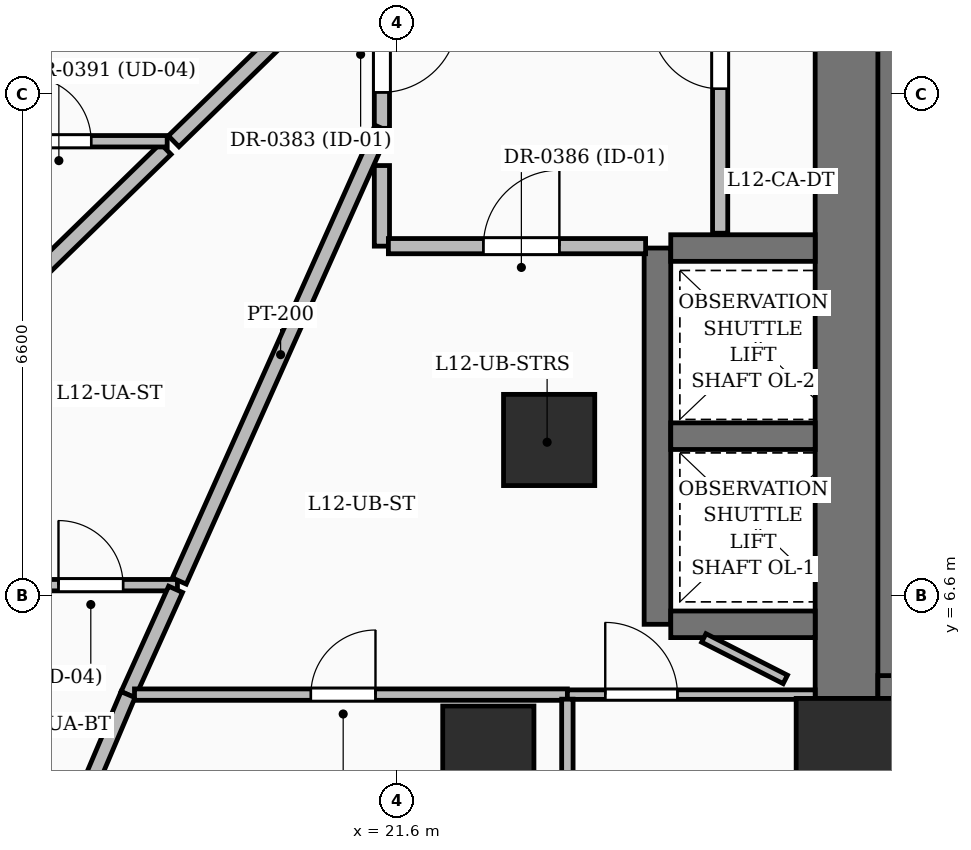
"""IFC4 building model, lengths in metres.
Left out: names, types, materials, properties, quantities, classifications, styles, units other than length and angle.
Written with IfcOpenShell. Run it as: python <this file> out.ifc"""

import sys

from ifc_helpers import new_model, si_unit, direction, frame, frame_2d, origin, origin_2d, place, context, subcontext, project, spatial, rectangle, extrude, element, fill, save


model = new_model("IFC4")
c1 = context("Model", 3, precision=1e-05, world=origin(), true_north=direction((0.0, 1.0)))
c2 = subcontext(c1, "Body", "Model", "MODEL_VIEW")
j1 = project(units=[si_unit("LENGTHUNIT", "METRE"), si_unit("PLANEANGLEUNIT", "RADIAN")], contexts=[c1])
p1 = place(None, origin())
s1 = spatial("IfcSite", under=j1, at=p1, CompositionType="ELEMENT")
p2 = place(p1, origin())
s2 = spatial("IfcBuilding", under=s1, at=p2, CompositionType="ELEMENT")
p3 = place(p2, frame((0.0, 0.0, 53.4)))
s3 = spatial("IfcBuildingStorey", under=s2, at=p3, CompositionType="ELEMENT", Elevation=53.4)
p4 = place(p3, frame((27.55, 4.55, 0.0), z_axis=(0.0, 0.0, 1.0), x_axis=(1.0, 0.0, 0.0)))
e1 = element("IfcColumn", 1, at=p4, inside=s3, PredefinedType="COLUMN", context=c2, shape_type="SweptSolid", body=[
    extrude(rectangle(XDim=1.4, YDim=1.4, at=origin_2d()), origin(), (0.0, 0.0, 1.0), 3.6),
])
for number, where, z_axis, x_axis in (
    (2, (22.8, 4.55, 0.0), (0.0, 0.0, 1.0), (1.0, 0.0, 0.0)),
    (3, (23.6, 8.65, 0.0), (0.0, 0.0, 1.0), (1.0, 0.0, 0.0)),
):
    element("IfcColumn", number, at=place(p3, frame(where, z_axis=z_axis, x_axis=x_axis)), inside=s3, PredefinedType="COLUMN", context=c2, shape_type="SweptSolid", body=[
        extrude(rectangle(XDim=1.2, YDim=1.2, at=origin_2d()), origin(), (0.0, 0.0, 1.0), 3.6),
    ])
p5 = place(p3, frame((27.55, 5.25, 0.0), z_axis=(0.0, 0.0, 1.0), x_axis=(0.0, 1.0, 0.0)))
e4 = element("IfcWall", 4, at=p5, inside=s3, PredefinedType="SHEAR", context=c2, shape_type="SweptSolid", body=[
    extrude(rectangle(XDim=8.8, YDim=0.9, at=frame_2d((4.4, 0.0))), origin(), (0.0, 0.0, 1.0), 3.6),
])
p6 = place(p3, frame((28.1, 5.2, 0.0), z_axis=(0.0, 0.0, 1.0), x_axis=(0.0, 1.0, 0.0)))
e5 = element("IfcWall", 5, at=p6, inside=s3, PredefinedType="SOLIDWALL", context=c2, shape_type="SweptSolid", body=[
    extrude(rectangle(XDim=9.1, YDim=0.35, at=frame_2d((4.55, 0.0))), origin(), (0.0, 0.0, 1.0), 3.6),
])
p7 = place(p3, frame((27.925, 5.375, 0.0), z_axis=(0.0, 0.0, 1.0), x_axis=(1.0, 0.0, 0.0)))
e6 = element("IfcWall", 6, at=p7, inside=s3, PredefinedType="SOLIDWALL", context=c2, shape_type="SweptSolid", body=[
    extrude(rectangle(XDim=3.55, YDim=0.35, at=frame_2d((1.775, 0.0))), origin(), (0.0, 0.0, 1.0), 3.6),
])
p8 = place(p3, frame((25.025, 6.225, 0.0), z_axis=(0.0, 0.0, 1.0), x_axis=(0.0, 1.0, 0.0)))
e7 = element("IfcWall", 7, at=p8, inside=s3, PredefinedType="SOLIDWALL", context=c2, shape_type="SweptSolid", body=[
    extrude(rectangle(XDim=4.95, YDim=0.35, at=frame_2d((2.475, 0.0))), origin(), (0.0, 0.0, 1.0), 3.6),
])
for number, where, z_axis, x_axis in (
    (8, (25.2, 6.225, 0.0), (0.0, 0.0, 1.0), (1.0, 0.0, 0.0)),
    (9, (25.2, 8.7, 0.0), (0.0, 0.0, 1.0), (1.0, 0.0, 0.0)),
    (10, (25.2, 11.175, 0.0), (0.0, 0.0, 1.0), (1.0, 0.0, 0.0)),
):
    element("IfcWall", number, at=place(p3, frame(where, z_axis=z_axis, x_axis=x_axis)), inside=s3, PredefinedType="SOLIDWALL", context=c2, shape_type="SweptSolid", body=[
        extrude(rectangle(XDim=1.9, YDim=0.35, at=frame_2d((0.95, 0.0))), origin(), (0.0, 0.0, 1.0), 3.6),
    ])
p9 = place(p3, frame((25.85, 11.37, 0.0), z_axis=(0.0, 0.0, 1.0), x_axis=(0.0, 1.0, 0.0)))
e11 = element("IfcWall", 11, at=p9, inside=s3, PredefinedType="PARTITIONING", context=c2, shape_type="SweptSolid", body=[
    extrude(rectangle(XDim=3.34, YDim=0.2, at=frame_2d((1.67, 0.0))), origin(), (0.0, 0.0, 1.0), 3.35),
])
p10 = place(p9, frame((1.9, 0.0, 0.0)))
e12 = element("IfcOpeningElement", 12, at=p10, cuts=e11, PredefinedType="OPENING", context=c2, shape_type="SweptSolid", body=[
    extrude(rectangle(XDim=0.9, YDim=2.1, at=frame_2d((0.45, 1.05))), frame((0.0, 0.11, 0.0), z_axis=(0.0, -1.0, 0.0), x_axis=(1.0, 0.0, 0.0)), (0.0, 0.0, 1.0), 0.22),
])
p11 = place(p3, frame((21.4, 15.09, 0.0), z_axis=(0.0, 0.0, 1.0), x_axis=(0.0, -1.0, 0.0)))
e13 = element("IfcWall", 13, at=p11, inside=s3, PredefinedType="PARTITIONING", context=c2, shape_type="SweptSolid", body=[
    extrude(rectangle(XDim=2.34, YDim=0.2, at=frame_2d((1.17, 0.0))), origin(), (0.0, 0.0, 1.0), 3.01),
])
p12 = place(p11, frame((0.867, 0.0, 0.0)))
e14 = element("IfcOpeningElement", 14, at=p12, cuts=e13, PredefinedType="OPENING", context=c2, shape_type="SweptSolid", body=[
    extrude(rectangle(XDim=1.0, YDim=2.2, at=frame_2d((0.5, 1.1))), frame((0.0, 0.11, 0.0), z_axis=(0.0, -1.0, 0.0), x_axis=(1.0, 0.0, 0.0)), (0.0, 0.0, 1.0), 0.22),
])
p13 = place(p3, frame((21.4, 12.26, 0.0), z_axis=(0.0, 0.0, 1.0), x_axis=(0.0, -1.0, 0.0)))
e15 = element("IfcWall", 15, at=p13, inside=s3, PredefinedType="PARTITIONING", context=c2, shape_type="SweptSolid", body=[
    extrude(rectangle(XDim=1.061, YDim=0.2, at=frame_2d((0.53, 0.0))), origin(), (0.0, 0.0, 1.0), 3.35),
])
p14 = place(p3, frame((21.485, 11.2, 0.0), z_axis=(0.0, 0.0, 1.0), x_axis=(1.0, 0.0, 0.0)))
e16 = element("IfcWall", 16, at=p14, inside=s3, PredefinedType="PARTITIONING", context=c2, shape_type="SweptSolid", body=[
    extrude(rectangle(XDim=3.384, YDim=0.2, at=frame_2d((1.692, 0.0))), origin(), (0.0, 0.0, 1.0), 3.01),
])
p15 = place(p14, frame((1.25, 0.0, 0.0)))
e17 = element("IfcOpeningElement", 17, at=p15, cuts=e16, PredefinedType="OPENING", context=c2, shape_type="SweptSolid", body=[
    extrude(rectangle(XDim=1.0, YDim=2.2, at=frame_2d((0.5, 1.1))), frame((0.0, 0.11, 0.0), z_axis=(0.0, -1.0, 0.0), x_axis=(1.0, 0.0, 0.0)), (0.0, 0.0, 1.0), 0.22),
])
p16 = place(p3, frame((16.43, 6.74, 0.0), z_axis=(0.0, 0.0, 1.0), x_axis=(1.0, 0.0, 0.0)))
e18 = element("IfcWall", 18, at=p16, inside=s3, PredefinedType="PARTITIONING", context=c2, shape_type="SweptSolid", body=[
    extrude(rectangle(XDim=2.28, YDim=0.15, at=frame_2d((1.14, 0.0))), origin(), (0.0, 0.0, 1.0), 2.37),
])
p17 = place(p16, frame((0.715, 0.0, 0.0)))
e19 = element("IfcOpeningElement", 19, at=p17, cuts=e18, PredefinedType="OPENING", context=c2, shape_type="SweptSolid", body=[
    extrude(rectangle(XDim=0.85, YDim=2.1, at=frame_2d((0.425, 1.05))), frame((0.0, 0.085, 0.0), z_axis=(0.0, -1.0, 0.0), x_axis=(1.0, 0.0, 0.0)), (0.0, 0.0, 1.0), 0.17),
])
p18 = place(p3, frame((18.735, 6.795, 0.0), z_axis=(0.0, 0.0, 1.0), x_axis=(0.408515389568, 0.912751431928, 0.0)))
e20 = element("IfcWall", 20, at=p18, inside=s3, PredefinedType="PARTITIONING", context=c2, shape_type="SweptSolid", body=[
    extrude(rectangle(XDim=6.524, YDim=0.2, at=frame_2d((3.262, 0.0))), origin(), (0.0, 0.0, 1.0), 2.279),
])
p19 = place(p3, frame((21.339, 15.191, 0.0), z_axis=(0.0, 0.0, 1.0), x_axis=(-0.716217041319, -0.697877603684, 0.0)))
e21 = element("IfcWall", 21, at=p19, inside=s3, PredefinedType="PARTITIONING", context=c2, shape_type="SweptSolid", body=[
    extrude(rectangle(XDim=3.741, YDim=0.2, at=frame_2d((1.87, 0.0))), origin(), (0.0, 0.0, 1.0), 3.35),
])
p20 = place(p3, frame((18.556, 12.479, 0.0), z_axis=(0.0, 0.0, 1.0), x_axis=(-0.716529276708, -0.69755701962, 0.0)))
e22 = element("IfcWall", 22, at=p20, inside=s3, PredefinedType="PARTITIONING", context=c2, shape_type="SweptSolid", body=[
    extrude(rectangle(XDim=3.925, YDim=0.2, at=frame_2d((1.962, 0.0))), origin(), (0.0, 0.0, 1.0), 2.279),
])
p21 = place(p3, frame((18.06, 5.3, 0.0), z_axis=(0.0, 0.0, 1.0), x_axis=(0.411393031605, 0.911458048155, 0.0)))
e23 = element("IfcWall", 23, at=p21, inside=s3, PredefinedType="PARTITIONING", context=c2, shape_type="SweptSolid", body=[
    extrude(rectangle(XDim=1.52, YDim=0.2, at=frame_2d((0.76, 0.0))), origin(), (0.0, 0.0, 1.0), 3.01),
])
p22 = place(p3, frame((16.627, 1.918, 0.0), z_axis=(0.0, 0.0, 1.0), x_axis=(0.390153809481, 0.920749697229, 0.0)))
e24 = element("IfcWall", 24, at=p22, inside=s3, PredefinedType="PARTITIONING", context=c2, shape_type="SweptSolid", body=[
    extrude(rectangle(XDim=3.673, YDim=0.2, at=frame_2d((1.836, 0.0))), origin(), (0.0, 0.0, 1.0), 2.37),
])
p23 = place(p3, frame((18.145, 5.3, 0.0), z_axis=(0.0, 0.0, 1.0), x_axis=(1.0, 0.0, 0.0)))
e25 = element("IfcWall", 25, at=p23, inside=s3, PredefinedType="PARTITIONING", context=c2, shape_type="SweptSolid", body=[
    extrude(rectangle(XDim=5.695, YDim=0.15, at=frame_2d((2.848, 0.0))), origin(), (0.0, 0.0, 1.0), 3.01),
])
p24 = place(p23, frame((2.32, 0.0, 0.0)))
e26 = element("IfcOpeningElement", 26, at=p24, cuts=e25, PredefinedType="OPENING", context=c2, shape_type="SweptSolid", body=[
    extrude(rectangle(XDim=0.85, YDim=2.1, at=frame_2d((0.425, 1.05))), frame((0.0, 0.085, 0.0), z_axis=(0.0, -1.0, 0.0), x_axis=(1.0, 0.0, 0.0)), (0.0, 0.0, 1.0), 0.17),
])
p25 = place(p3, frame((23.84, 5.3, 0.0), z_axis=(0.0, 0.0, 1.0), x_axis=(1.0, 0.0, 0.0)))
e27 = element("IfcWall", 27, at=p25, inside=s3, PredefinedType="PARTITIONING", context=c2, shape_type="SweptSolid", body=[
    extrude(rectangle(XDim=3.26, YDim=0.125, at=frame_2d((1.63, 0.0))), origin(), (0.0, 0.0, 1.0), 3.35),
])
p26 = place(p25, frame((0.498, 0.0, 0.0)))
e28 = element("IfcOpeningElement", 28, at=p26, cuts=e27, PredefinedType="OPENING", context=c2, shape_type="SweptSolid", body=[
    extrude(rectangle(XDim=0.95, YDim=2.2, at=frame_2d((0.475, 1.1))), frame((0.0, 0.072, 0.0), z_axis=(0.0, -1.0, 0.0), x_axis=(1.0, 0.0, 0.0)), (0.0, 0.0, 1.0), 0.145),
])
p27 = place(p3, frame((23.84, 1.9, 0.0), z_axis=(0.0, 0.0, 1.0), x_axis=(0.0, 1.0, 0.0)))
e29 = element("IfcWall", 29, at=p27, inside=s3, PredefinedType="PARTITIONING", context=c2, shape_type="SweptSolid", body=[
    extrude(rectangle(XDim=3.34, YDim=0.15, at=frame_2d((1.67, 0.0))), origin(), (0.0, 0.0, 1.0), 2.309),
])
p28 = place(p3, frame((15.64, 12.58, 0.0), z_axis=(0.0, 0.0, 1.0), x_axis=(1.0, 0.0, 0.0)))
e30 = element("IfcWall", 30, at=p28, inside=s3, PredefinedType="PARTITIONING", context=c2, shape_type="SweptSolid", body=[
    extrude(rectangle(XDim=2.935, YDim=0.15, at=frame_2d((1.468, 0.0))), origin(), (0.0, 0.0, 1.0), 3.01),
])
p29 = place(p28, frame((1.085, 0.0, 0.0)))
e31 = element("IfcOpeningElement", 31, at=p29, cuts=e30, PredefinedType="OPENING", context=c2, shape_type="SweptSolid", body=[
    extrude(rectangle(XDim=0.85, YDim=2.1, at=frame_2d((0.425, 1.05))), frame((0.0, 0.085, 0.0), z_axis=(0.0, -1.0, 0.0), x_axis=(1.0, 0.0, 0.0)), (0.0, 0.0, 1.0), 0.17),
])
p30 = place(p3, frame((25.635, 6.046, 0.0), z_axis=(0.0, 0.0, 1.0), x_axis=(0.891197428161, -0.453615634694, 0.0)))
e32 = element("IfcWall", 32, at=p30, inside=s3, PredefinedType="PARTITIONING", context=c2, shape_type="SweptSolid", body=[
    extrude(rectangle(XDim=1.203, YDim=0.125, at=frame_2d((0.602, 0.0))), origin(), (0.0, 0.0, 1.0), 3.35),
])
p31 = place(p10, origin())
e33 = element("IfcDoor", 33, at=p31, inside=s3, OperationType="SINGLE_SWING_RIGHT", PredefinedType="DOOR", context=c2, shape_type="SweptSolid", body=[
    extrude(rectangle(XDim=0.9, YDim=2.1, at=frame_2d((0.45, 1.05))), frame((0.0, 0.025, 0.0), z_axis=(0.0, -1.0, 0.0), x_axis=(1.0, 0.0, 0.0)), (0.0, 0.0, 1.0), 0.05),
])
fill(e12, e33)
p32 = place(p12, origin())
e34 = element("IfcDoor", 34, at=p32, inside=s3, OperationType="SINGLE_SWING_LEFT", PredefinedType="DOOR", context=c2, shape_type="SweptSolid", body=[
    extrude(rectangle(XDim=1.0, YDim=2.2, at=frame_2d((0.5, 1.1))), frame((0.0, 0.025, 0.0), z_axis=(0.0, -1.0, 0.0), x_axis=(1.0, 0.0, 0.0)), (0.0, 0.0, 1.0), 0.05),
])
fill(e14, e34)
p33 = place(p17, origin())
e35 = element("IfcDoor", 35, at=p33, inside=s3, OperationType="SINGLE_SWING_LEFT", PredefinedType="DOOR", context=c2, shape_type="SweptSolid", body=[
    extrude(rectangle(XDim=0.85, YDim=2.1, at=frame_2d((0.425, 1.05))), frame((0.0, 0.025, 0.0), z_axis=(0.0, -1.0, 0.0), x_axis=(1.0, 0.0, 0.0)), (0.0, 0.0, 1.0), 0.05),
])
fill(e19, e35)
p34 = place(p15, origin())
e36 = element("IfcDoor", 36, at=p34, inside=s3, OperationType="SINGLE_SWING_RIGHT", PredefinedType="DOOR", context=c2, shape_type="SweptSolid", body=[
    extrude(rectangle(XDim=1.0, YDim=2.2, at=frame_2d((0.5, 1.1))), frame((0.0, 0.025, 0.0), z_axis=(0.0, -1.0, 0.0), x_axis=(1.0, 0.0, 0.0)), (0.0, 0.0, 1.0), 0.05),
])
fill(e17, e36)
p35 = place(p26, origin())
e37 = element("IfcDoor", 37, at=p35, inside=s3, OperationType="SINGLE_SWING_LEFT", PredefinedType="DOOR", context=c2, shape_type="SweptSolid", body=[
    extrude(rectangle(XDim=0.95, YDim=2.2, at=frame_2d((0.475, 1.1))), frame((0.0, 0.025, 0.0), z_axis=(0.0, -1.0, 0.0), x_axis=(1.0, 0.0, 0.0)), (0.0, 0.0, 1.0), 0.05),
])
fill(e28, e37)
p36 = place(p24, origin())
e38 = element("IfcDoor", 38, at=p36, inside=s3, OperationType="SINGLE_SWING_RIGHT", PredefinedType="DOOR", context=c2, shape_type="SweptSolid", body=[
    extrude(rectangle(XDim=0.85, YDim=2.1, at=frame_2d((0.425, 1.05))), frame((0.0, 0.025, 0.0), z_axis=(0.0, -1.0, 0.0), x_axis=(1.0, 0.0, 0.0)), (0.0, 0.0, 1.0), 0.05),
])
fill(e26, e38)
p37 = place(p29, origin())
e39 = element("IfcDoor", 39, at=p37, inside=s3, OperationType="SINGLE_SWING_LEFT", PredefinedType="DOOR", context=c2, shape_type="SweptSolid", body=[
    extrude(rectangle(XDim=0.85, YDim=2.1, at=frame_2d((0.425, 1.05))), frame((0.0, 0.025, 0.0), z_axis=(0.0, -1.0, 0.0), x_axis=(1.0, 0.0, 0.0)), (0.0, 0.0, 1.0), 0.05),
])
fill(e31, e39)
save(model, sys.argv[1])
